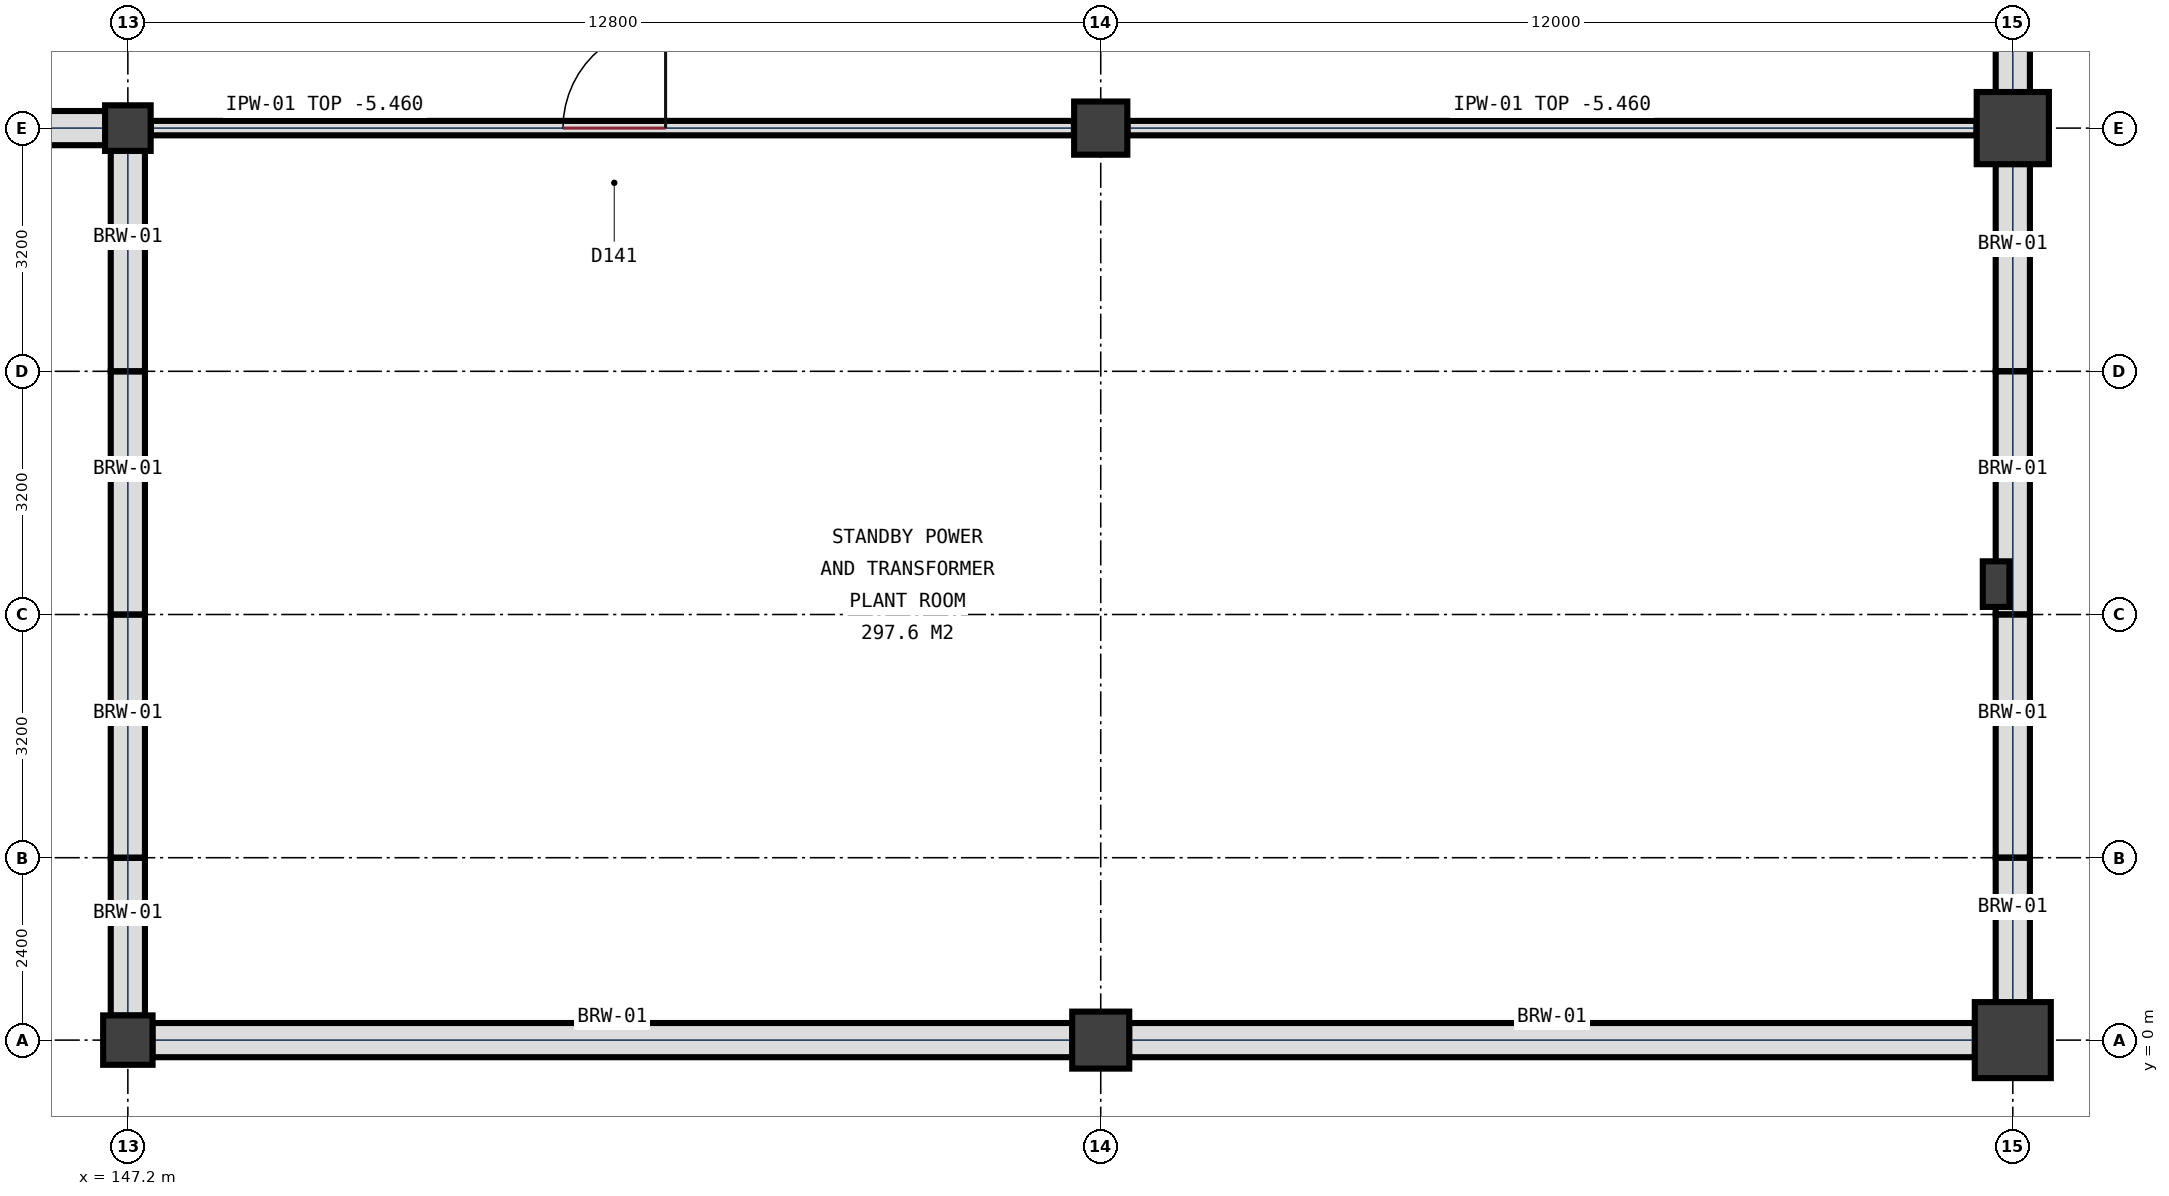
"""IFC4 building model, lengths in metres.
Left out: names, types, materials, properties, quantities, classifications, styles, units other than length and angle.
Written with IfcOpenShell. Run it as: python <this file> out.ifc"""

import sys

from ifc_helpers import new_model, si_unit, direction, frame, frame_2d, origin, origin_2d, place, context, subcontext, project, spatial, rectangle, extrude, element, fill, save


model = new_model("IFC4")
c1 = context("Model", 3, precision=1e-05, world=origin(), true_north=direction((0.0, 1.0)))
c2 = subcontext(c1, "Body", "Model", "MODEL_VIEW")
j1 = project(units=[si_unit("LENGTHUNIT", "METRE"), si_unit("PLANEANGLEUNIT", "RADIAN")], contexts=[c1])
p1 = place(None, origin())
s1 = spatial("IfcSite", under=j1, at=p1, CompositionType="ELEMENT")
p2 = place(p1, origin())
s2 = spatial("IfcBuilding", under=s1, at=p2, CompositionType="ELEMENT")
p3 = place(p2, frame((0.0, 0.0, -8.4)))
s3 = spatial("IfcBuildingStorey", under=s2, at=p3, CompositionType="ELEMENT", Elevation=-8.4)
p4 = place(p3, frame((147.2, 0.0, 0.0), z_axis=(0.0, 0.0, 1.0), x_axis=(1.0, 0.0, 0.0)))
e1 = element("IfcColumn", 1, at=p4, inside=s3, PredefinedType="COLUMN", context=c2, shape_type="SweptSolid", body=[
    extrude(rectangle(XDim=0.65, YDim=0.65, at=origin_2d()), origin(), (0.0, 0.0, 1.0), 4.2),
])
p5 = place(p3, frame((147.2, 12.0, 0.0), z_axis=(0.0, 0.0, 1.0), x_axis=(1.0, 0.0, 0.0)))
e2 = element("IfcColumn", 2, at=p5, inside=s3, PredefinedType="COLUMN", context=c2, shape_type="SweptSolid", body=[
    extrude(rectangle(XDim=0.6, YDim=0.6, at=origin_2d()), origin(), (0.0, 0.0, 1.0), 4.2),
])
p6 = place(p3, frame((160.0, 0.0, 0.0), z_axis=(0.0, 0.0, 1.0), x_axis=(1.0, 0.0, 0.0)))
e3 = element("IfcColumn", 3, at=p6, inside=s3, PredefinedType="COLUMN", context=c2, shape_type="SweptSolid", body=[
    extrude(rectangle(XDim=0.75, YDim=0.75, at=origin_2d()), origin(), (0.0, 0.0, 1.0), 4.2),
])
p7 = place(p3, frame((160.0, 12.0, 0.0), z_axis=(0.0, 0.0, 1.0), x_axis=(1.0, 0.0, 0.0)))
e4 = element("IfcColumn", 4, at=p7, inside=s3, PredefinedType="COLUMN", context=c2, shape_type="SweptSolid", body=[
    extrude(rectangle(XDim=0.7, YDim=0.7, at=origin_2d()), origin(), (0.0, 0.0, 1.0), 4.2),
])
p8 = place(p3, frame((172.0, 0.0, 0.0), z_axis=(0.0, 0.0, 1.0), x_axis=(1.0, 0.0, 0.0)))
e5 = element("IfcColumn", 5, at=p8, inside=s3, PredefinedType="COLUMN", context=c2, shape_type="SweptSolid", body=[
    extrude(rectangle(XDim=1.0, YDim=1.0, at=origin_2d()), origin(), (0.0, 0.0, 1.0), 4.2),
])
p9 = place(p3, frame((172.0, 12.0, 0.0), z_axis=(0.0, 0.0, 1.0), x_axis=(1.0, 0.0, 0.0)))
e6 = element("IfcColumn", 6, at=p9, inside=s3, PredefinedType="COLUMN", context=c2, shape_type="SweptSolid", body=[
    extrude(rectangle(XDim=0.95, YDim=0.95, at=origin_2d()), origin(), (0.0, 0.0, 1.0), 4.2),
])
p10 = place(p3, frame((171.78, 6.0, 0.0), z_axis=(0.0, 0.0, 1.0), x_axis=(1.0, 0.0, 0.0)))
e7 = element("IfcColumn", 7, at=p10, inside=s3, PredefinedType="PILASTER", context=c2, shape_type="SweptSolid", body=[
    extrude(rectangle(XDim=0.35, YDim=0.6, at=origin_2d()), origin(), (0.0, 0.0, 1.0), 4.2),
])
p11 = place(p3, frame((172.0, 21.152, 0.0), z_axis=(0.0, 0.0, 1.0), x_axis=(0.0, -1.0, 0.0)))
e8 = element("IfcWall", 8, at=p11, inside=s3, PredefinedType="USERDEFINED", context=c2, shape_type="SweptSolid", body=[
    extrude(rectangle(XDim=8.679, YDim=0.45, at=frame_2d((4.34, 0.0))), origin(), (0.0, 0.0, 1.0), 3.88),
])
p12 = place(p3, frame((172.0, 11.527, 0.0), z_axis=(0.0, 0.0, 1.0), x_axis=(0.0, -1.0, 0.0)))
e9 = element("IfcWall", 9, at=p12, inside=s3, PredefinedType="USERDEFINED", context=c2, shape_type="SweptSolid", body=[
    extrude(rectangle(XDim=2.725, YDim=0.45, at=frame_2d((1.363, 0.0))), origin(), (0.0, 0.0, 1.0), 3.9),
])
p13 = place(p3, frame((172.0, 8.798, 0.0), z_axis=(0.0, 0.0, 1.0), x_axis=(0.0, -1.0, 0.0)))
e10 = element("IfcWall", 10, at=p13, inside=s3, PredefinedType="USERDEFINED", context=c2, shape_type="SweptSolid", body=[
    extrude(rectangle(XDim=3.196, YDim=0.45, at=frame_2d((1.598, 0.0))), origin(), (0.0, 0.0, 1.0), 3.9),
])
p14 = place(p3, frame((172.0, 5.598, 0.0), z_axis=(0.0, 0.0, 1.0), x_axis=(0.0, -1.0, 0.0)))
e11 = element("IfcWall", 11, at=p14, inside=s3, PredefinedType="USERDEFINED", context=c2, shape_type="SweptSolid", body=[
    extrude(rectangle(XDim=3.196, YDim=0.45, at=frame_2d((1.598, 0.0))), origin(), (0.0, 0.0, 1.0), 3.9),
])
p15 = place(p3, frame((172.0, 2.398, 0.0), z_axis=(0.0, 0.0, 1.0), x_axis=(0.0, -1.0, 0.0)))
e12 = element("IfcWall", 12, at=p15, inside=s3, PredefinedType="USERDEFINED", context=c2, shape_type="SweptSolid", body=[
    extrude(rectangle(XDim=1.9, YDim=0.45, at=frame_2d((0.95, 0.0))), origin(), (0.0, 0.0, 1.0), 3.9),
])
p16 = place(p3, frame((171.502, 0.0, 0.0), z_axis=(0.0, 0.0, 1.0), x_axis=(-1.0, 0.0, 0.0)))
e13 = element("IfcWall", 13, at=p16, inside=s3, PredefinedType="USERDEFINED", context=c2, shape_type="SweptSolid", body=[
    extrude(rectangle(XDim=11.129, YDim=0.45, at=frame_2d((5.564, 0.0))), origin(), (0.0, 0.0, 1.0), 3.9),
])
p17 = place(p3, frame((159.627, 0.0, 0.0), z_axis=(0.0, 0.0, 1.0), x_axis=(-1.0, 0.0, 0.0)))
e14 = element("IfcWall", 14, at=p17, inside=s3, PredefinedType="USERDEFINED", context=c2, shape_type="SweptSolid", body=[
    extrude(rectangle(XDim=12.104, YDim=0.45, at=frame_2d((6.052, 0.0))), origin(), (0.0, 0.0, 1.0), 3.9),
])
p18 = place(p3, frame((147.2, 0.323, 0.0), z_axis=(0.0, 0.0, 1.0), x_axis=(0.0, 1.0, 0.0)))
e15 = element("IfcWall", 15, at=p18, inside=s3, PredefinedType="USERDEFINED", context=c2, shape_type="SweptSolid", body=[
    extrude(rectangle(XDim=2.075, YDim=0.45, at=frame_2d((1.038, 0.0))), origin(), (0.0, 0.0, 1.0), 3.9),
])
p19 = place(p3, frame((147.2, 2.402, 0.0), z_axis=(0.0, 0.0, 1.0), x_axis=(0.0, 1.0, 0.0)))
e16 = element("IfcWall", 16, at=p19, inside=s3, PredefinedType="USERDEFINED", context=c2, shape_type="SweptSolid", body=[
    extrude(rectangle(XDim=3.196, YDim=0.45, at=frame_2d((1.598, 0.0))), origin(), (0.0, 0.0, 1.0), 3.9),
])
p20 = place(p3, frame((147.2, 5.602, 0.0), z_axis=(0.0, 0.0, 1.0), x_axis=(0.0, 1.0, 0.0)))
e17 = element("IfcWall", 17, at=p20, inside=s3, PredefinedType="USERDEFINED", context=c2, shape_type="SweptSolid", body=[
    extrude(rectangle(XDim=3.196, YDim=0.45, at=frame_2d((1.598, 0.0))), origin(), (0.0, 0.0, 1.0), 3.9),
])
p21 = place(p3, frame((147.2, 8.802, 0.0), z_axis=(0.0, 0.0, 1.0), x_axis=(0.0, 1.0, 0.0)))
e18 = element("IfcWall", 18, at=p21, inside=s3, PredefinedType="USERDEFINED", context=c2, shape_type="SweptSolid", body=[
    extrude(rectangle(XDim=2.9, YDim=0.45, at=frame_2d((1.45, 0.0))), origin(), (0.0, 0.0, 1.0), 3.9),
])
p22 = place(p3, frame((146.902, 12.0, 0.0), z_axis=(0.0, 0.0, 1.0), x_axis=(-1.0, 0.0, 0.0)))
e19 = element("IfcWall", 19, at=p22, inside=s3, PredefinedType="USERDEFINED", context=c2, shape_type="SweptSolid", body=[
    extrude(rectangle(XDim=12.204, YDim=0.45, at=frame_2d((6.102, 0.0))), origin(), (0.0, 0.0, 1.0), 3.88),
])
p23 = place(p3, frame((147.503, 12.0, 0.0), z_axis=(0.0, 0.0, 1.0), x_axis=(1.0, 0.0, 0.0)))
e20 = element("IfcWall", 20, at=p23, inside=s3, PredefinedType="PARTITIONING", context=c2, shape_type="SweptSolid", body=[
    extrude(rectangle(XDim=12.144, YDim=0.19, at=frame_2d((6.072, 0.0))), origin(), (0.0, 0.0, 1.0), 2.94),
])
p24 = place(p23, frame((5.422, 0.0, 0.0)))
e21 = element("IfcOpeningElement", 21, at=p24, cuts=e20, PredefinedType="OPENING", context=c2, shape_type="SweptSolid", body=[
    extrude(rectangle(XDim=1.35, YDim=2.25, at=frame_2d((0.675, 1.125))), frame((0.0, 0.105, 0.0), z_axis=(0.0, -1.0, 0.0), x_axis=(1.0, 0.0, 0.0)), (0.0, 0.0, 1.0), 0.21),
])
p25 = place(p3, frame((160.353, 12.0, 0.0), z_axis=(0.0, 0.0, 1.0), x_axis=(1.0, 0.0, 0.0)))
e22 = element("IfcWall", 22, at=p25, inside=s3, PredefinedType="PARTITIONING", context=c2, shape_type="SweptSolid", body=[
    extrude(rectangle(XDim=11.169, YDim=0.19, at=frame_2d((5.584, 0.0))), origin(), (0.0, 0.0, 1.0), 2.94),
])
p26 = place(p24, origin())
e23 = element("IfcDoor", 23, at=p26, inside=s3, OperationType="SINGLE_SWING_RIGHT", PredefinedType="DOOR", context=c2, shape_type="SweptSolid", body=[
    extrude(rectangle(XDim=1.35, YDim=2.25, at=frame_2d((0.675, 1.125))), frame((0.0, 0.032, 0.0), z_axis=(0.0, -1.0, 0.0), x_axis=(1.0, 0.0, 0.0)), (0.0, 0.0, 1.0), 0.065),
])
fill(e21, e23)
save(model, sys.argv[1])
